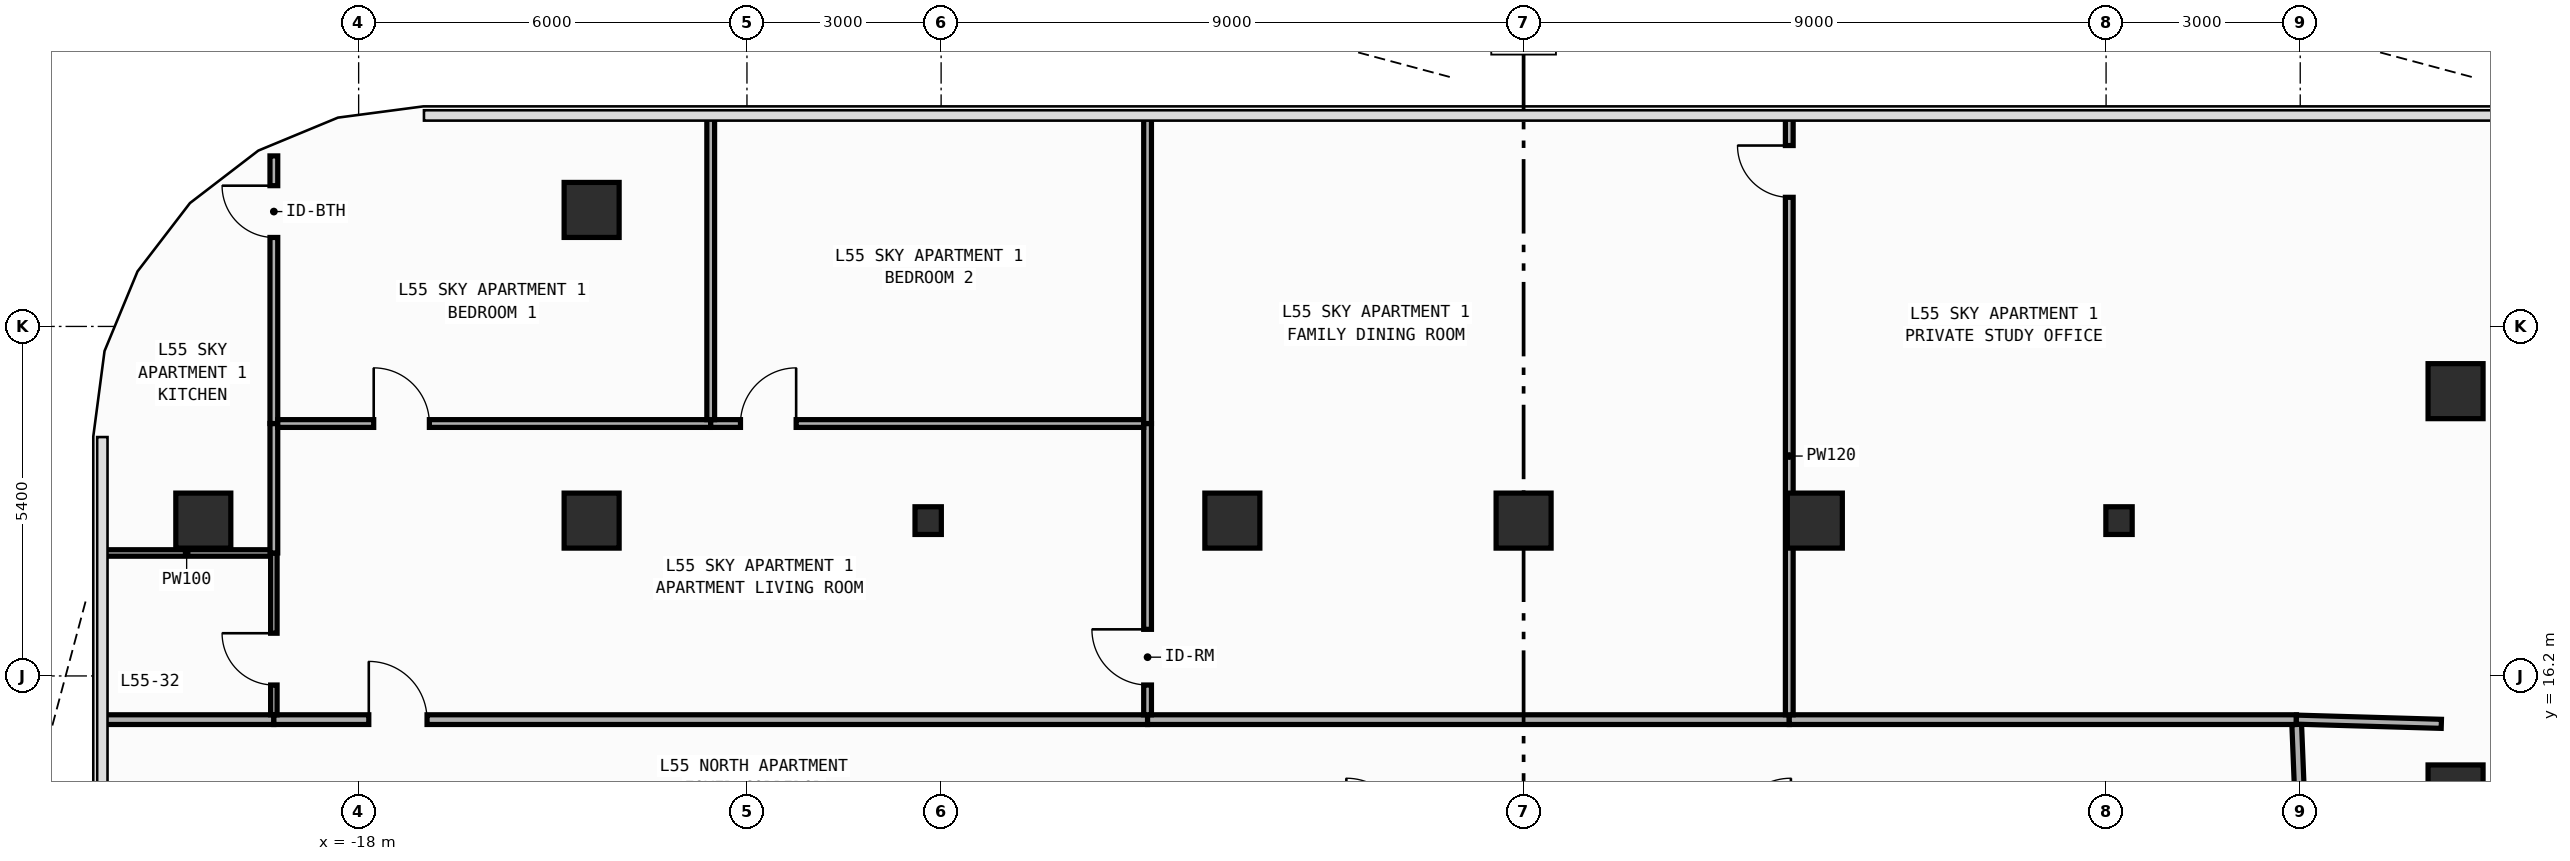
"""IFC4 building model, lengths in metres.
Left out: names, types, materials, properties, quantities, classifications, styles, units other than length and angle.
Written with IfcOpenShell. Run it as: python <this file> out.ifc"""

import sys

from ifc_helpers import new_model, si_unit, direction, frame, frame_2d, origin, origin_2d, place, context, subcontext, project, spatial, rectangle, i_section, extrude, element, fill, save


model = new_model("IFC4")
c1 = context("Model", 3, precision=1e-05, world=origin(), true_north=direction((0.0, 1.0)))
c2 = subcontext(c1, "Body", "Model", "MODEL_VIEW")
j1 = project(units=[si_unit("LENGTHUNIT", "METRE"), si_unit("PLANEANGLEUNIT", "RADIAN")], contexts=[c1])
p1 = place(None, origin())
s1 = spatial("IfcSite", under=j1, at=p1, CompositionType="ELEMENT")
p2 = place(p1, origin())
s2 = spatial("IfcBuilding", under=s1, at=p2, CompositionType="ELEMENT")
p3 = place(p2, frame((0.0, 0.0, 236.8)))
s3 = spatial("IfcBuildingStorey", under=s2, at=p3, CompositionType="ELEMENT", Elevation=236.8)
for number, where, z_axis, x_axis in (
    (1, (-9.2, 18.6, 0.0), (0.0, 0.0, 1.0), (1.0, 0.0, 0.0)),
    (2, (9.2, 18.6, 0.0), (0.0, 0.0, 1.0), (1.0, 0.0, 0.0)),
):
    element("IfcColumn", number, at=place(p3, frame(where, z_axis=z_axis, x_axis=x_axis)), inside=s3, PredefinedType="COLUMN", context=c2, shape_type="SweptSolid", body=[
        extrude(i_section(OverallWidth=0.407, OverallDepth=0.428, WebThickness=0.02, FlangeThickness=0.035, FilletRadius=0.022, at=origin_2d()), origin(), (0.0, 0.0, 1.0), 3.6),
    ])
for number, where, z_axis, x_axis in (
    (3, (-20.4, 18.6, 0.0), (0.0, 0.0, 1.0), (1.0, 0.0, 0.0)),
    (4, (-14.4, 18.6, 0.0), (0.0, 0.0, 1.0), (1.0, 0.0, 0.0)),
    (5, (14.4, 14.4, 0.0), (0.0, 0.0, 1.0), (1.0, 0.0, 0.0)),
    (6, (-4.5, 18.6, 0.0), (0.0, 0.0, 1.0), (1.0, 0.0, 0.0)),
    (7, (0.0, 18.6, 0.0), (0.0, 0.0, 1.0), (1.0, 0.0, 0.0)),
    (8, (4.5, 18.6, 0.0), (0.0, 0.0, 1.0), (1.0, 0.0, 0.0)),
    (9, (-14.4, 23.4, 0.0), (0.0, 0.0, 1.0), (1.0, 0.0, 0.0)),
    (10, (14.4, 20.6, 0.0), (0.0, 0.0, 1.0), (1.0, 0.0, 0.0)),
):
    element("IfcColumn", number, at=place(p3, frame(where, z_axis=z_axis, x_axis=x_axis)), inside=s3, PredefinedType="COLUMN", context=c2, shape_type="SweptSolid", body=[
        extrude(rectangle(XDim=0.85, YDim=0.85, at=origin_2d()), origin(), (0.0, 0.0, 1.0), 3.6),
    ])
p4 = place(p3, frame((-21.955, 15.525, 0.0), z_axis=(0.0, 0.0, 1.0), x_axis=(1.0, 0.0, 0.0)))
e11 = element("IfcWall", 11, at=p4, inside=s3, PredefinedType="PARTITIONING", context=c2, shape_type="SweptSolid", body=[
    extrude(rectangle(XDim=2.645, YDim=0.15, at=frame_2d((1.323, 0.0))), origin(), (0.0, 0.0, 1.0), 3.34),
])
p5 = place(p3, frame((-19.31, 15.525, 0.0), z_axis=(0.0, 0.0, 1.0), x_axis=(1.0, 0.0, 0.0)))
e12 = element("IfcWall", 12, at=p5, inside=s3, PredefinedType="PARTITIONING", context=c2, shape_type="SweptSolid", body=[
    extrude(rectangle(XDim=13.5, YDim=0.15, at=frame_2d((6.75, 0.0))), origin(), (0.0, 0.0, 1.0), 3.34),
])
p6 = place(p5, frame((1.467, 0.0, 0.0)))
e13 = element("IfcOpeningElement", 13, at=p6, cuts=e12, PredefinedType="OPENING", context=c2, shape_type="SweptSolid", body=[
    extrude(rectangle(XDim=0.9, YDim=2.15, at=frame_2d((0.45, 1.075))), frame((0.0, 0.085, 0.0), z_axis=(0.0, -1.0, 0.0), x_axis=(1.0, 0.0, 0.0)), (0.0, 0.0, 1.0), 0.17),
])
p7 = place(p3, frame((-5.81, 15.525, 0.0), z_axis=(0.0, 0.0, 1.0), x_axis=(1.0, 0.0, 0.0)))
e14 = element("IfcWall", 14, at=p7, inside=s3, PredefinedType="PARTITIONING", context=c2, shape_type="SweptSolid", body=[
    extrude(rectangle(XDim=9.915, YDim=0.15, at=frame_2d((4.958, 0.0))), origin(), (0.0, 0.0, 1.0), 3.34),
])
p8 = place(p3, frame((4.105, 15.525, 0.0), z_axis=(0.0, 0.0, 1.0), x_axis=(1.0, 0.0, 0.0)))
e15 = element("IfcWall", 15, at=p8, inside=s3, PredefinedType="PARTITIONING", context=c2, shape_type="SweptSolid", body=[
    extrude(rectangle(XDim=7.835, YDim=0.15, at=frame_2d((3.917, 0.0))), origin(), (0.0, 0.0, 1.0), 3.34),
])
p9 = place(p3, frame((12.015, 13.72, 0.0), z_axis=(0.0, 0.0, 1.0), x_axis=(-0.040046877756, 0.99919780203, 0.0)))
e16 = element("IfcWall", 16, at=p9, inside=s3, PredefinedType="PARTITIONING", context=c2, shape_type="SweptSolid", body=[
    extrude(rectangle(XDim=1.731, YDim=0.15, at=frame_2d((0.866, 0.0))), origin(), (0.0, 0.0, 1.0), 3.34),
])
p10 = place(p3, frame((-21.955, 18.1, 0.0), z_axis=(0.0, 0.0, 1.0), x_axis=(1.0, 0.0, 0.0)))
e17 = element("IfcWall", 17, at=p10, inside=s3, PredefinedType="PARTITIONING", context=c2, shape_type="SweptSolid", body=[
    extrude(rectangle(XDim=2.595, YDim=0.1, at=frame_2d((1.297, 0.0))), origin(), (0.0, 0.0, 1.0), 3.34),
])
p11 = place(p3, frame((-19.31, 15.6, 0.0), z_axis=(0.0, 0.0, 1.0), x_axis=(0.0, 1.0, 0.0)))
e18 = element("IfcWall", 18, at=p11, inside=s3, PredefinedType="PARTITIONING", context=c2, shape_type="SweptSolid", body=[
    extrude(rectangle(XDim=2.5, YDim=0.1, at=frame_2d((1.25, 0.0))), origin(), (0.0, 0.0, 1.0), 3.34),
])
p12 = place(p11, frame((0.46, 0.0, 0.0)))
e19 = element("IfcOpeningElement", 19, at=p12, cuts=e18, PredefinedType="OPENING", context=c2, shape_type="SweptSolid", body=[
    extrude(rectangle(XDim=0.8, YDim=2.1, at=frame_2d((0.4, 1.05))), frame((0.0, 0.06, 0.0), z_axis=(0.0, -1.0, 0.0), x_axis=(1.0, 0.0, 0.0)), (0.0, 0.0, 1.0), 0.12),
])
p13 = place(p3, frame((-19.31, 18.1, 0.0), z_axis=(0.0, 0.0, 1.0), x_axis=(0.0, 1.0, 0.0)))
e20 = element("IfcWall", 20, at=p13, inside=s3, PredefinedType="PARTITIONING", context=c2, shape_type="SweptSolid", body=[
    extrude(rectangle(XDim=2.0, YDim=0.12, at=frame_2d((1.0, 0.0))), origin(), (0.0, 0.0, 1.0), 3.34),
])
p14 = place(p3, frame((-19.31, 20.1, 0.0), z_axis=(0.0, 0.0, 1.0), x_axis=(0.0, 1.0, 0.0)))
e21 = element("IfcWall", 21, at=p14, inside=s3, PredefinedType="PARTITIONING", context=c2, shape_type="SweptSolid", body=[
    extrude(rectangle(XDim=4.135, YDim=0.12, at=frame_2d((2.067, 0.0))), origin(), (0.0, 0.0, 1.0), 3.34),
])
p15 = place(p14, frame((2.875, 0.0, 0.0)))
e22 = element("IfcOpeningElement", 22, at=p15, cuts=e21, PredefinedType="OPENING", context=c2, shape_type="SweptSolid", body=[
    extrude(rectangle(XDim=0.8, YDim=2.1, at=frame_2d((0.4, 1.05))), frame((0.0, 0.07, 0.0), z_axis=(0.0, -1.0, 0.0), x_axis=(1.0, 0.0, 0.0)), (0.0, 0.0, 1.0), 0.14),
])
p16 = place(p3, frame((-5.81, 15.6, 0.0), z_axis=(0.0, 0.0, 1.0), x_axis=(0.0, 1.0, 0.0)))
e23 = element("IfcWall", 23, at=p16, inside=s3, PredefinedType="PARTITIONING", context=c2, shape_type="SweptSolid", body=[
    extrude(rectangle(XDim=4.5, YDim=0.12, at=frame_2d((2.25, 0.0))), origin(), (0.0, 0.0, 1.0), 3.34),
])
p17 = place(p16, frame((0.46, 0.0, 0.0)))
e24 = element("IfcOpeningElement", 24, at=p17, cuts=e23, PredefinedType="OPENING", context=c2, shape_type="SweptSolid", body=[
    extrude(rectangle(XDim=0.86, YDim=2.15, at=frame_2d((0.43, 1.075))), frame((0.0, 0.07, 0.0), z_axis=(0.0, -1.0, 0.0), x_axis=(1.0, 0.0, 0.0)), (0.0, 0.0, 1.0), 0.14),
])
p18 = place(p3, frame((-19.25, 20.1, 0.0), z_axis=(0.0, 0.0, 1.0), x_axis=(1.0, 0.0, 0.0)))
e25 = element("IfcWall", 25, at=p18, inside=s3, PredefinedType="PARTITIONING", context=c2, shape_type="SweptSolid", body=[
    extrude(rectangle(XDim=6.69, YDim=0.12, at=frame_2d((3.345, 0.0))), origin(), (0.0, 0.0, 1.0), 3.34),
])
p19 = place(p18, frame((1.483, 0.0, 0.0)))
e26 = element("IfcOpeningElement", 26, at=p19, cuts=e25, PredefinedType="OPENING", context=c2, shape_type="SweptSolid", body=[
    extrude(rectangle(XDim=0.86, YDim=2.15, at=frame_2d((0.43, 1.075))), frame((0.0, 0.07, 0.0), z_axis=(0.0, -1.0, 0.0), x_axis=(1.0, 0.0, 0.0)), (0.0, 0.0, 1.0), 0.14),
])
p20 = place(p3, frame((-12.56, 20.1, 0.0), z_axis=(0.0, 0.0, 1.0), x_axis=(1.0, 0.0, 0.0)))
e27 = element("IfcWall", 27, at=p20, inside=s3, PredefinedType="PARTITIONING", context=c2, shape_type="SweptSolid", body=[
    extrude(rectangle(XDim=6.69, YDim=0.12, at=frame_2d((3.345, 0.0))), origin(), (0.0, 0.0, 1.0), 3.34),
])
p21 = place(p20, frame((0.46, 0.0, 0.0)))
e28 = element("IfcOpeningElement", 28, at=p21, cuts=e27, PredefinedType="OPENING", context=c2, shape_type="SweptSolid", body=[
    extrude(rectangle(XDim=0.86, YDim=2.15, at=frame_2d((0.43, 1.075))), frame((0.0, 0.07, 0.0), z_axis=(0.0, -1.0, 0.0), x_axis=(1.0, 0.0, 0.0)), (0.0, 0.0, 1.0), 0.14),
])
p22 = place(p3, frame((4.105, 15.6, 0.0), z_axis=(0.0, 0.0, 1.0), x_axis=(0.0, 1.0, 0.0)))
e29 = element("IfcWall", 29, at=p22, inside=s3, PredefinedType="PARTITIONING", context=c2, shape_type="SweptSolid", body=[
    extrude(rectangle(XDim=9.255, YDim=0.12, at=frame_2d((4.627, 0.0))), origin(), (0.0, 0.0, 1.0), 3.34),
])
p23 = place(p22, frame((7.995, 0.0, 0.0)))
e30 = element("IfcOpeningElement", 30, at=p23, cuts=e29, PredefinedType="OPENING", context=c2, shape_type="SweptSolid", body=[
    extrude(rectangle(XDim=0.8, YDim=2.1, at=frame_2d((0.4, 1.05))), frame((0.0, 0.07, 0.0), z_axis=(0.0, -1.0, 0.0), x_axis=(1.0, 0.0, 0.0)), (0.0, 0.0, 1.0), 0.14),
])
p24 = place(p3, frame((-5.81, 20.1, 0.0), z_axis=(0.0, 0.0, 1.0), x_axis=(0.0, 1.0, 0.0)))
e31 = element("IfcWall", 31, at=p24, inside=s3, PredefinedType="PARTITIONING", context=c2, shape_type="SweptSolid", body=[
    extrude(rectangle(XDim=4.755, YDim=0.12, at=frame_2d((2.377, 0.0))), origin(), (0.0, 0.0, 1.0), 3.34),
])
p25 = place(p3, frame((11.94, 15.525, 0.0), z_axis=(0.0, 0.0, 1.0), x_axis=(0.99958000177, -0.028979649098, 0.0)))
e32 = element("IfcWall", 32, at=p25, inside=s3, PredefinedType="PARTITIONING", context=c2, shape_type="SweptSolid", body=[
    extrude(rectangle(XDim=2.241, YDim=0.14, at=frame_2d((1.121, 0.0))), origin(), (0.0, 0.0, 1.0), 3.34),
])
p26 = place(p3, frame((-12.56, 20.16, 0.0), z_axis=(0.0, 0.0, 1.0), x_axis=(0.0, 1.0, 0.0)))
e33 = element("IfcWall", 33, at=p26, inside=s3, PredefinedType="PARTITIONING", context=c2, shape_type="SweptSolid", body=[
    extrude(rectangle(XDim=4.695, YDim=0.12, at=frame_2d((2.348, 0.0))), origin(), (0.0, 0.0, 1.0), 3.34),
])
p27 = place(p6, origin())
e34 = element("IfcDoor", 34, at=p27, inside=s3, OperationType="SINGLE_SWING_LEFT", PredefinedType="DOOR", context=c2, shape_type="SweptSolid", body=[
    extrude(rectangle(XDim=0.9, YDim=2.15, at=frame_2d((0.45, 1.075))), frame((0.0, 0.025, 0.0), z_axis=(0.0, -1.0, 0.0), x_axis=(1.0, 0.0, 0.0)), (0.0, 0.0, 1.0), 0.05),
])
fill(e13, e34)
p28 = place(p12, origin())
e35 = element("IfcDoor", 35, at=p28, inside=s3, OperationType="SINGLE_SWING_RIGHT", PredefinedType="DOOR", context=c2, shape_type="SweptSolid", body=[
    extrude(rectangle(XDim=0.8, YDim=2.1, at=frame_2d((0.4, 1.05))), frame((0.0, 0.025, 0.0), z_axis=(0.0, -1.0, 0.0), x_axis=(1.0, 0.0, 0.0)), (0.0, 0.0, 1.0), 0.05),
])
fill(e19, e35)
p29 = place(p17, origin())
e36 = element("IfcDoor", 36, at=p29, inside=s3, OperationType="SINGLE_SWING_RIGHT", PredefinedType="DOOR", context=c2, shape_type="SweptSolid", body=[
    extrude(rectangle(XDim=0.86, YDim=2.15, at=frame_2d((0.43, 1.075))), frame((0.0, 0.025, 0.0), z_axis=(0.0, -1.0, 0.0), x_axis=(1.0, 0.0, 0.0)), (0.0, 0.0, 1.0), 0.05),
])
fill(e24, e36)
p30 = place(p19, origin())
e37 = element("IfcDoor", 37, at=p30, inside=s3, OperationType="SINGLE_SWING_LEFT", PredefinedType="DOOR", context=c2, shape_type="SweptSolid", body=[
    extrude(rectangle(XDim=0.86, YDim=2.15, at=frame_2d((0.43, 1.075))), frame((0.0, 0.025, 0.0), z_axis=(0.0, -1.0, 0.0), x_axis=(1.0, 0.0, 0.0)), (0.0, 0.0, 1.0), 0.05),
])
fill(e26, e37)
p31 = place(p21, origin())
e38 = element("IfcDoor", 38, at=p31, inside=s3, OperationType="SINGLE_SWING_RIGHT", PredefinedType="DOOR", context=c2, shape_type="SweptSolid", body=[
    extrude(rectangle(XDim=0.86, YDim=2.15, at=frame_2d((0.43, 1.075))), frame((0.0, 0.025, 0.0), z_axis=(0.0, -1.0, 0.0), x_axis=(1.0, 0.0, 0.0)), (0.0, 0.0, 1.0), 0.05),
])
fill(e28, e38)
p32 = place(p23, origin())
e39 = element("IfcDoor", 39, at=p32, inside=s3, OperationType="SINGLE_SWING_RIGHT", PredefinedType="DOOR", context=c2, shape_type="SweptSolid", body=[
    extrude(rectangle(XDim=0.8, YDim=2.1, at=frame_2d((0.4, 1.05))), frame((0.0, 0.025, 0.0), z_axis=(0.0, -1.0, 0.0), x_axis=(1.0, 0.0, 0.0)), (0.0, 0.0, 1.0), 0.05),
])
fill(e30, e39)
p33 = place(p15, origin())
e40 = element("IfcDoor", 40, at=p33, inside=s3, OperationType="SINGLE_SWING_RIGHT", PredefinedType="DOOR", context=c2, shape_type="SweptSolid", body=[
    extrude(rectangle(XDim=0.8, YDim=2.1, at=frame_2d((0.4, 1.05))), frame((0.0, 0.025, 0.0), z_axis=(0.0, -1.0, 0.0), x_axis=(1.0, 0.0, 0.0)), (0.0, 0.0, 1.0), 0.05),
])
fill(e22, e40)
save(model, sys.argv[1])
